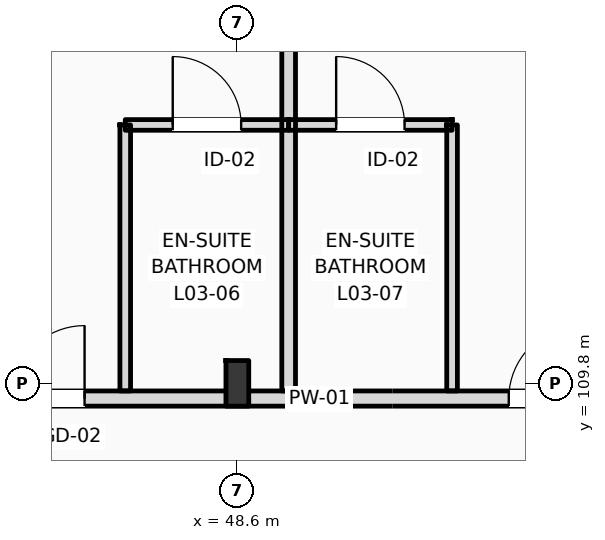
"""IFC4 building model, lengths in metres.
Left out: names, types, materials, properties, quantities, classifications, styles, units other than length and angle.
Written with IfcOpenShell. Run it as: python <this file> out.ifc"""

import sys

from ifc_helpers import new_model, si_unit, direction, frame, frame_2d, origin, origin_2d, place, context, subcontext, project, spatial, rectangle, i_section, extrude, element, fill, save


model = new_model("IFC4")
c1 = context("Model", 3, precision=1e-05, world=origin(), true_north=direction((0.0, 1.0)))
c2 = subcontext(c1, "Body", "Model", "MODEL_VIEW")
j1 = project(units=[si_unit("LENGTHUNIT", "METRE"), si_unit("PLANEANGLEUNIT", "RADIAN")], contexts=[c1])
p1 = place(None, origin())
s1 = spatial("IfcSite", under=j1, at=p1, CompositionType="ELEMENT")
p2 = place(p1, origin())
s2 = spatial("IfcBuilding", under=s1, at=p2, CompositionType="ELEMENT")
p3 = place(p2, frame((0.0, 0.0, 16.2)))
s3 = spatial("IfcBuildingStorey", under=s2, at=p3, CompositionType="ELEMENT", Elevation=16.2)
p4 = place(p3, frame((48.6, 109.8, 0.0), z_axis=(0.0, 0.0, 1.0), x_axis=(1.0, 0.0, 0.0)))
e1 = element("IfcColumn", 1, at=p4, inside=s3, PredefinedType="COLUMN", context=c2, shape_type="SweptSolid", body=[
    extrude(i_section(OverallWidth=0.3, OverallDepth=0.6, WebThickness=0.015, FlangeThickness=0.03, FilletRadius=0.027, at=origin_2d()), origin(), (0.0, 0.0, 1.0), 4.2),
])
p5 = place(p3, frame((10.65, 109.6, 0.0), z_axis=(0.0, 0.0, 1.0), x_axis=(1.0, 0.0, 0.0)))
e2 = element("IfcWall", 2, at=p5, inside=s3, PredefinedType="PARTITIONING", context=c2, shape_type="SweptSolid", body=[
    extrude(rectangle(XDim=109.21, YDim=0.2, at=frame_2d((54.605, 0.0))), origin(), (0.0, 0.0, 1.0), 3.36),
])
p6 = place(p5, frame((15.43, 0.0, 0.0)))
e3 = element("IfcOpeningElement", 3, at=p6, cuts=e2, PredefinedType="OPENING", context=c2, shape_type="SweptSolid", body=[
    extrude(rectangle(XDim=1.02, YDim=2.2, at=frame_2d((0.51, 1.1))), frame((0.0, 0.11, 0.0), z_axis=(0.0, -1.0, 0.0), x_axis=(1.0, 0.0, 0.0)), (0.0, 0.0, 1.0), 0.22),
])
p7 = place(p5, frame((19.537, 0.0, 0.0)))
e4 = element("IfcOpeningElement", 4, at=p7, cuts=e2, PredefinedType="OPENING", context=c2, shape_type="SweptSolid", body=[
    extrude(rectangle(XDim=1.02, YDim=2.2, at=frame_2d((0.51, 1.1))), frame((0.0, 0.11, 0.0), z_axis=(0.0, -1.0, 0.0), x_axis=(1.0, 0.0, 0.0)), (0.0, 0.0, 1.0), 0.22),
])
p8 = place(p5, frame((23.928, 0.0, 0.0)))
e5 = element("IfcOpeningElement", 5, at=p8, cuts=e2, PredefinedType="OPENING", context=c2, shape_type="SweptSolid", body=[
    extrude(rectangle(XDim=1.02, YDim=2.2, at=frame_2d((0.51, 1.1))), frame((0.0, 0.11, 0.0), z_axis=(0.0, -1.0, 0.0), x_axis=(1.0, 0.0, 0.0)), (0.0, 0.0, 1.0), 0.22),
])
p9 = place(p5, frame((26.169, 0.0, 0.0)))
e6 = element("IfcOpeningElement", 6, at=p9, cuts=e2, PredefinedType="OPENING", context=c2, shape_type="SweptSolid", body=[
    extrude(rectangle(XDim=1.02, YDim=2.2, at=frame_2d((0.51, 1.1))), frame((0.0, 0.11, 0.0), z_axis=(0.0, -1.0, 0.0), x_axis=(1.0, 0.0, 0.0)), (0.0, 0.0, 1.0), 0.22),
])
p10 = place(p5, frame((32.739, 0.0, 0.0)))
e7 = element("IfcOpeningElement", 7, at=p10, cuts=e2, PredefinedType="OPENING", context=c2, shape_type="SweptSolid", body=[
    extrude(rectangle(XDim=0.96, YDim=2.2, at=frame_2d((0.48, 1.1))), frame((0.0, 0.11, 0.0), z_axis=(0.0, -1.0, 0.0), x_axis=(1.0, 0.0, 0.0)), (0.0, 0.0, 1.0), 0.22),
])
p11 = place(p5, frame((34.98, 0.0, 0.0)))
e8 = element("IfcOpeningElement", 8, at=p11, cuts=e2, PredefinedType="OPENING", context=c2, shape_type="SweptSolid", body=[
    extrude(rectangle(XDim=0.96, YDim=2.2, at=frame_2d((0.48, 1.1))), frame((0.0, 0.11, 0.0), z_axis=(0.0, -1.0, 0.0), x_axis=(1.0, 0.0, 0.0)), (0.0, 0.0, 1.0), 0.22),
])
p12 = place(p5, frame((41.521, 0.0, 0.0)))
e9 = element("IfcOpeningElement", 9, at=p12, cuts=e2, PredefinedType="OPENING", context=c2, shape_type="SweptSolid", body=[
    extrude(rectangle(XDim=0.96, YDim=2.2, at=frame_2d((0.48, 1.1))), frame((0.0, 0.11, 0.0), z_axis=(0.0, -1.0, 0.0), x_axis=(1.0, 0.0, 0.0)), (0.0, 0.0, 1.0), 0.22),
])
p13 = place(p5, frame((43.512, 0.0, 0.0)))
e10 = element("IfcOpeningElement", 10, at=p13, cuts=e2, PredefinedType="OPENING", context=c2, shape_type="SweptSolid", body=[
    extrude(rectangle(XDim=0.96, YDim=2.2, at=frame_2d((0.48, 1.1))), frame((0.0, 0.11, 0.0), z_axis=(0.0, -1.0, 0.0), x_axis=(1.0, 0.0, 0.0)), (0.0, 0.0, 1.0), 0.22),
])
p14 = place(p5, frame((50.303, 0.0, 0.0)))
e11 = element("IfcOpeningElement", 11, at=p14, cuts=e2, PredefinedType="OPENING", context=c2, shape_type="SweptSolid", body=[
    extrude(rectangle(XDim=0.96, YDim=2.2, at=frame_2d((0.48, 1.1))), frame((0.0, 0.11, 0.0), z_axis=(0.0, -1.0, 0.0), x_axis=(1.0, 0.0, 0.0)), (0.0, 0.0, 1.0), 0.22),
])
p15 = place(p5, frame((54.944, 0.0, 0.0)))
e12 = element("IfcOpeningElement", 12, at=p15, cuts=e2, PredefinedType="OPENING", context=c2, shape_type="SweptSolid", body=[
    extrude(rectangle(XDim=0.96, YDim=2.2, at=frame_2d((0.48, 1.1))), frame((0.0, 0.11, 0.0), z_axis=(0.0, -1.0, 0.0), x_axis=(1.0, 0.0, 0.0)), (0.0, 0.0, 1.0), 0.22),
])
p16 = place(p5, frame((59.085, 0.0, 0.0)))
e13 = element("IfcOpeningElement", 13, at=p16, cuts=e2, PredefinedType="OPENING", context=c2, shape_type="SweptSolid", body=[
    extrude(rectangle(XDim=0.96, YDim=2.2, at=frame_2d((0.48, 1.1))), frame((0.0, 0.11, 0.0), z_axis=(0.0, -1.0, 0.0), x_axis=(1.0, 0.0, 0.0)), (0.0, 0.0, 1.0), 0.22),
])
p17 = place(p5, frame((63.476, 0.0, 0.0)))
e14 = element("IfcOpeningElement", 14, at=p17, cuts=e2, PredefinedType="OPENING", context=c2, shape_type="SweptSolid", body=[
    extrude(rectangle(XDim=0.96, YDim=2.2, at=frame_2d((0.48, 1.1))), frame((0.0, 0.11, 0.0), z_axis=(0.0, -1.0, 0.0), x_axis=(1.0, 0.0, 0.0)), (0.0, 0.0, 1.0), 0.22),
])
p18 = place(p5, frame((65.716, 0.0, 0.0)))
e15 = element("IfcOpeningElement", 15, at=p18, cuts=e2, PredefinedType="OPENING", context=c2, shape_type="SweptSolid", body=[
    extrude(rectangle(XDim=0.96, YDim=2.2, at=frame_2d((0.48, 1.1))), frame((0.0, 0.11, 0.0), z_axis=(0.0, -1.0, 0.0), x_axis=(1.0, 0.0, 0.0)), (0.0, 0.0, 1.0), 0.22),
])
p19 = place(p5, frame((72.257, 0.0, 0.0)))
e16 = element("IfcOpeningElement", 16, at=p19, cuts=e2, PredefinedType="OPENING", context=c2, shape_type="SweptSolid", body=[
    extrude(rectangle(XDim=0.96, YDim=2.2, at=frame_2d((0.48, 1.1))), frame((0.0, 0.11, 0.0), z_axis=(0.0, -1.0, 0.0), x_axis=(1.0, 0.0, 0.0)), (0.0, 0.0, 1.0), 0.22),
])
p20 = place(p5, frame((74.498, 0.0, 0.0)))
e17 = element("IfcOpeningElement", 17, at=p20, cuts=e2, PredefinedType="OPENING", context=c2, shape_type="SweptSolid", body=[
    extrude(rectangle(XDim=0.96, YDim=2.2, at=frame_2d((0.48, 1.1))), frame((0.0, 0.11, 0.0), z_axis=(0.0, -1.0, 0.0), x_axis=(1.0, 0.0, 0.0)), (0.0, 0.0, 1.0), 0.22),
])
p21 = place(p5, frame((81.039, 0.0, 0.0)))
e18 = element("IfcOpeningElement", 18, at=p21, cuts=e2, PredefinedType="OPENING", context=c2, shape_type="SweptSolid", body=[
    extrude(rectangle(XDim=0.96, YDim=2.2, at=frame_2d((0.48, 1.1))), frame((0.0, 0.11, 0.0), z_axis=(0.0, -1.0, 0.0), x_axis=(1.0, 0.0, 0.0)), (0.0, 0.0, 1.0), 0.22),
])
p22 = place(p5, frame((85.68, 0.0, 0.0)))
e19 = element("IfcOpeningElement", 19, at=p22, cuts=e2, PredefinedType="OPENING", context=c2, shape_type="SweptSolid", body=[
    extrude(rectangle(XDim=0.96, YDim=2.2, at=frame_2d((0.48, 1.1))), frame((0.0, 0.11, 0.0), z_axis=(0.0, -1.0, 0.0), x_axis=(1.0, 0.0, 0.0)), (0.0, 0.0, 1.0), 0.22),
])
p23 = place(p5, frame((89.82, 0.0, 0.0)))
e20 = element("IfcOpeningElement", 20, at=p23, cuts=e2, PredefinedType="OPENING", context=c2, shape_type="SweptSolid", body=[
    extrude(rectangle(XDim=0.96, YDim=2.2, at=frame_2d((0.48, 1.1))), frame((0.0, 0.11, 0.0), z_axis=(0.0, -1.0, 0.0), x_axis=(1.0, 0.0, 0.0)), (0.0, 0.0, 1.0), 0.22),
])
p24 = place(p5, frame((94.211, 0.0, 0.0)))
e21 = element("IfcOpeningElement", 21, at=p24, cuts=e2, PredefinedType="OPENING", context=c2, shape_type="SweptSolid", body=[
    extrude(rectangle(XDim=0.96, YDim=2.2, at=frame_2d((0.48, 1.1))), frame((0.0, 0.11, 0.0), z_axis=(0.0, -1.0, 0.0), x_axis=(1.0, 0.0, 0.0)), (0.0, 0.0, 1.0), 0.22),
])
p25 = place(p5, frame((98.602, 0.0, 0.0)))
e22 = element("IfcOpeningElement", 22, at=p25, cuts=e2, PredefinedType="OPENING", context=c2, shape_type="SweptSolid", body=[
    extrude(rectangle(XDim=0.96, YDim=2.2, at=frame_2d((0.48, 1.1))), frame((0.0, 0.11, 0.0), z_axis=(0.0, -1.0, 0.0), x_axis=(1.0, 0.0, 0.0)), (0.0, 0.0, 1.0), 0.22),
])
p26 = place(p5, frame((102.993, 0.0, 0.0)))
e23 = element("IfcOpeningElement", 23, at=p26, cuts=e2, PredefinedType="OPENING", context=c2, shape_type="SweptSolid", body=[
    extrude(rectangle(XDim=0.96, YDim=2.2, at=frame_2d((0.48, 1.1))), frame((0.0, 0.11, 0.0), z_axis=(0.0, -1.0, 0.0), x_axis=(1.0, 0.0, 0.0)), (0.0, 0.0, 1.0), 0.22),
])
p27 = place(p5, frame((105.269, 0.0, 0.0)))
e24 = element("IfcOpeningElement", 24, at=p27, cuts=e2, PredefinedType="OPENING", context=c2, shape_type="SweptSolid", body=[
    extrude(rectangle(XDim=0.96, YDim=2.2, at=frame_2d((0.48, 1.1))), frame((0.0, 0.11, 0.0), z_axis=(0.0, -1.0, 0.0), x_axis=(1.0, 0.0, 0.0)), (0.0, 0.0, 1.0), 0.22),
])
p28 = place(p5, frame((2.716, 0.0, 0.0)))
e25 = element("IfcOpeningElement", 25, at=p28, cuts=e2, PredefinedType="OPENING", context=c2, shape_type="SweptSolid", body=[
    extrude(rectangle(XDim=1.35, YDim=2.25, at=frame_2d((0.675, 1.125))), frame((0.0, 0.11, 0.0), z_axis=(0.0, -1.0, 0.0), x_axis=(1.0, 0.0, 0.0)), (0.0, 0.0, 1.0), 0.22),
])
p29 = place(p5, frame((6.65, 0.0, 0.0)))
e26 = element("IfcOpeningElement", 26, at=p29, cuts=e2, PredefinedType="OPENING", context=c2, shape_type="SweptSolid", body=[
    extrude(rectangle(XDim=1.35, YDim=2.25, at=frame_2d((0.675, 1.125))), frame((0.0, 0.11, 0.0), z_axis=(0.0, -1.0, 0.0), x_axis=(1.0, 0.0, 0.0)), (0.0, 0.0, 1.0), 0.22),
])
p30 = place(p5, frame((10.583, 0.0, 0.0)))
e27 = element("IfcOpeningElement", 27, at=p30, cuts=e2, PredefinedType="OPENING", context=c2, shape_type="SweptSolid", body=[
    extrude(rectangle(XDim=1.35, YDim=2.25, at=frame_2d((0.675, 1.125))), frame((0.0, 0.11, 0.0), z_axis=(0.0, -1.0, 0.0), x_axis=(1.0, 0.0, 0.0)), (0.0, 0.0, 1.0), 0.22),
])
p31 = place(p3, frame((49.275, 109.7, 0.0), z_axis=(0.0, 0.0, 1.0), x_axis=(0.0, 1.0, 0.0)))
e28 = element("IfcWall", 28, at=p31, inside=s3, PredefinedType="PARTITIONING", context=c2, shape_type="SweptSolid", body=[
    extrude(rectangle(XDim=8.15, YDim=0.18, at=frame_2d((4.075, 0.0))), origin(), (0.0, 0.0, 1.0), 3.92),
])
p32 = place(p3, frame((47.125, 109.7, 0.0), z_axis=(0.0, 0.0, 1.0), x_axis=(0.0, 1.0, 0.0)))
e29 = element("IfcWall", 29, at=p32, inside=s3, PredefinedType="PARTITIONING", context=c2, shape_type="SweptSolid", body=[
    extrude(rectangle(XDim=3.5, YDim=0.14, at=frame_2d((1.75, 0.0))), origin(), (0.0, 0.0, 1.0), 3.92),
])
p33 = place(p3, frame((47.125, 113.2, 0.0), z_axis=(0.0, 0.0, 1.0), x_axis=(1.0, 0.0, 0.0)))
e30 = element("IfcWall", 30, at=p33, inside=s3, PredefinedType="PARTITIONING", context=c2, shape_type="SweptSolid", body=[
    extrude(rectangle(XDim=2.15, YDim=0.14, at=frame_2d((1.075, 0.0))), origin(), (0.0, 0.0, 1.0), 3.92),
])
p34 = place(p33, frame((0.625, 0.0, 0.0)))
e31 = element("IfcOpeningElement", 31, at=p34, cuts=e30, PredefinedType="OPENING", context=c2, shape_type="SweptSolid", body=[
    extrude(rectangle(XDim=0.9, YDim=2.1, at=frame_2d((0.45, 1.05))), frame((0.0, 0.08, 0.0), z_axis=(0.0, -1.0, 0.0), x_axis=(1.0, 0.0, 0.0)), (0.0, 0.0, 1.0), 0.16),
])
p35 = place(p3, frame((51.425, 109.7, 0.0), z_axis=(0.0, 0.0, 1.0), x_axis=(0.0, 1.0, 0.0)))
e32 = element("IfcWall", 32, at=p35, inside=s3, PredefinedType="PARTITIONING", context=c2, shape_type="SweptSolid", body=[
    extrude(rectangle(XDim=3.5, YDim=0.14, at=frame_2d((1.75, 0.0))), origin(), (0.0, 0.0, 1.0), 3.61),
])
p36 = place(p3, frame((49.275, 113.2, 0.0), z_axis=(0.0, 0.0, 1.0), x_axis=(1.0, 0.0, 0.0)))
e33 = element("IfcWall", 33, at=p36, inside=s3, PredefinedType="PARTITIONING", context=c2, shape_type="SweptSolid", body=[
    extrude(rectangle(XDim=2.15, YDim=0.14, at=frame_2d((1.075, 0.0))), origin(), (0.0, 0.0, 1.0), 3.92),
])
p37 = place(p36, frame((0.625, 0.0, 0.0)))
e34 = element("IfcOpeningElement", 34, at=p37, cuts=e33, PredefinedType="OPENING", context=c2, shape_type="SweptSolid", body=[
    extrude(rectangle(XDim=0.9, YDim=2.1, at=frame_2d((0.45, 1.05))), frame((0.0, 0.08, 0.0), z_axis=(0.0, -1.0, 0.0), x_axis=(1.0, 0.0, 0.0)), (0.0, 0.0, 1.0), 0.16),
])
p38 = place(p11, origin())
e35 = element("IfcDoor", 35, at=p38, inside=s3, OperationType="SINGLE_SWING_RIGHT", PredefinedType="DOOR", context=c2, shape_type="SweptSolid", body=[
    extrude(rectangle(XDim=0.96, YDim=2.2, at=frame_2d((0.48, 1.1))), frame((0.0, 0.025, 0.0), z_axis=(0.0, -1.0, 0.0), x_axis=(1.0, 0.0, 0.0)), (0.0, 0.0, 1.0), 0.05),
])
fill(e8, e35)
p39 = place(p34, origin())
e36 = element("IfcDoor", 36, at=p39, inside=s3, OperationType="SINGLE_SWING_LEFT", PredefinedType="DOOR", context=c2, shape_type="SweptSolid", body=[
    extrude(rectangle(XDim=0.9, YDim=2.1, at=frame_2d((0.45, 1.05))), frame((0.0, 0.025, 0.0), z_axis=(0.0, -1.0, 0.0), x_axis=(1.0, 0.0, 0.0)), (0.0, 0.0, 1.0), 0.05),
])
fill(e31, e36)
p40 = place(p12, origin())
e37 = element("IfcDoor", 37, at=p40, inside=s3, OperationType="SINGLE_SWING_RIGHT", PredefinedType="DOOR", context=c2, shape_type="SweptSolid", body=[
    extrude(rectangle(XDim=0.96, YDim=2.2, at=frame_2d((0.48, 1.1))), frame((0.0, 0.025, 0.0), z_axis=(0.0, -1.0, 0.0), x_axis=(1.0, 0.0, 0.0)), (0.0, 0.0, 1.0), 0.05),
])
fill(e9, e37)
p41 = place(p37, origin())
e38 = element("IfcDoor", 38, at=p41, inside=s3, OperationType="SINGLE_SWING_LEFT", PredefinedType="DOOR", context=c2, shape_type="SweptSolid", body=[
    extrude(rectangle(XDim=0.9, YDim=2.1, at=frame_2d((0.45, 1.05))), frame((0.0, 0.025, 0.0), z_axis=(0.0, -1.0, 0.0), x_axis=(1.0, 0.0, 0.0)), (0.0, 0.0, 1.0), 0.05),
])
fill(e34, e38)
save(model, sys.argv[1])
